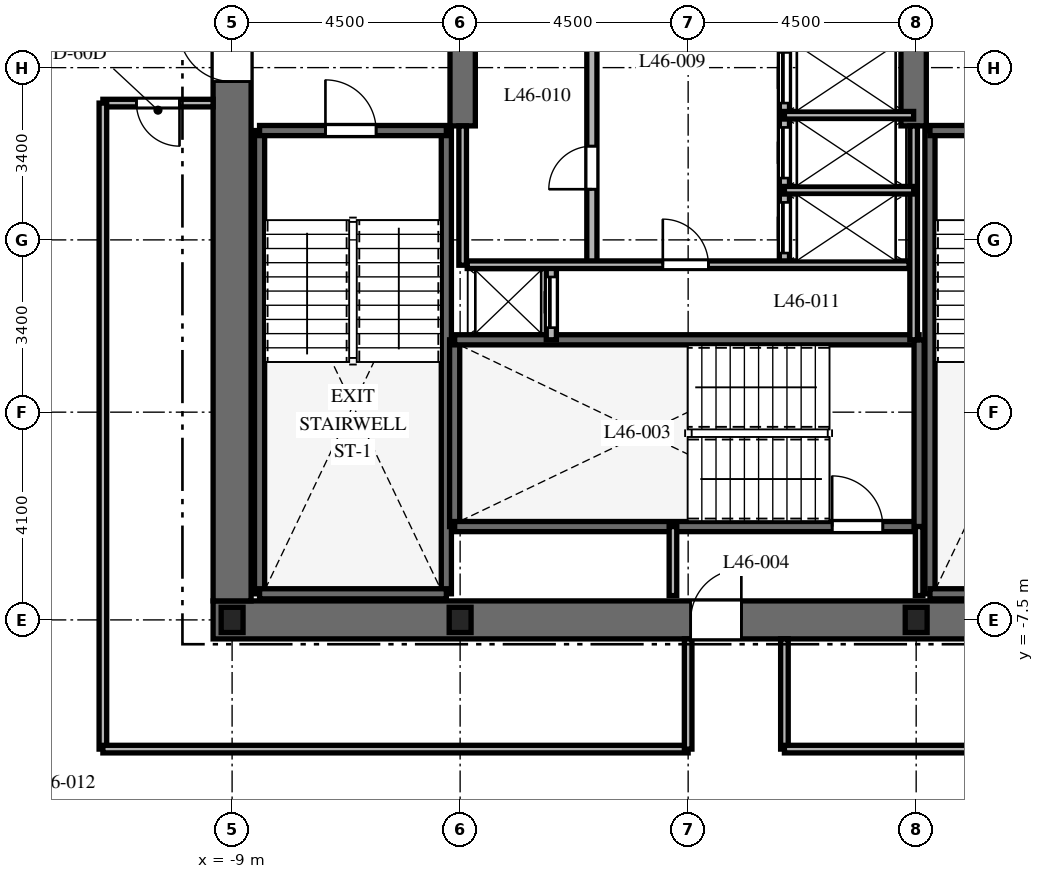
"""IFC4 building model, lengths in metres.
Left out: names, types, materials, properties, quantities, classifications, styles, units other than length and angle.
Written with IfcOpenShell. Run it as: python <this file> out.ifc"""

import sys

from ifc_helpers import new_model, si_unit, direction, frame, frame_2d, origin, origin_2d, place, context, subcontext, project, spatial, rectangle, i_section, extrude, element, fill, save


model = new_model("IFC4")
c1 = context("Model", 3, precision=1e-05, world=origin(), true_north=direction((0.0, 1.0)))
c2 = subcontext(c1, "Body", "Model", "MODEL_VIEW")
j1 = project(units=[si_unit("LENGTHUNIT", "METRE"), si_unit("PLANEANGLEUNIT", "RADIAN")], contexts=[c1])
p1 = place(None, origin())
s1 = spatial("IfcSite", under=j1, at=p1, CompositionType="ELEMENT")
p2 = place(p1, origin())
s2 = spatial("IfcBuilding", under=s1, at=p2, CompositionType="ELEMENT")
p3 = place(p2, frame((0.0, 0.0, 186.7)))
s3 = spatial("IfcBuildingStorey", under=s2, at=p3, CompositionType="ELEMENT", Elevation=186.7)
p4 = place(p3, frame((-9.375, -7.5, 0.0), z_axis=(0.0, 0.0, 1.0), x_axis=(1.0, 0.0, 0.0)))
e1 = element("IfcWall", 1, at=p4, inside=s3, PredefinedType="SHEAR", context=c2, shape_type="SweptSolid", body=[
    extrude(rectangle(XDim=18.75, YDim=0.75, at=frame_2d((9.375, 0.0))), origin(), (0.0, 0.0, 1.0), 3.7),
])
p5 = place(p4, frame((9.425, 0.0, 0.0)))
e2 = element("IfcOpeningElement", 2, at=p5, cuts=e1, PredefinedType="OPENING", context=c2, shape_type="SweptSolid", body=[
    extrude(rectangle(XDim=1.0, YDim=2.15, at=frame_2d((0.5, 1.075))), frame((0.0, 0.385, 0.0), z_axis=(0.0, -1.0, 0.0), x_axis=(1.0, 0.0, 0.0)), (0.0, 0.0, 1.0), 0.77),
])
p6 = place(p3, frame((-9.0, -7.125, 0.0), z_axis=(0.0, 0.0, 1.0), x_axis=(0.0, 1.0, 0.0)))
e3 = element("IfcWall", 3, at=p6, inside=s3, PredefinedType="SHEAR", context=c2, shape_type="SweptSolid", body=[
    extrude(rectangle(XDim=14.25, YDim=0.75, at=frame_2d((7.125, 0.0))), origin(), (0.0, 0.0, 1.0), 3.7),
])
p7 = place(p6, frame((10.25, 0.0, 0.0)))
e4 = element("IfcOpeningElement", 4, at=p7, cuts=e3, PredefinedType="OPENING", context=c2, shape_type="SweptSolid", body=[
    extrude(rectangle(XDim=1.05, YDim=2.15, at=frame_2d((0.525, 1.075))), frame((0.0, 0.385, 0.0), z_axis=(0.0, -1.0, 0.0), x_axis=(1.0, 0.0, 0.0)), (0.0, 0.0, 1.0), 0.77),
])
for number, where, z_axis, x_axis in (
    (5, (-4.45, 2.25, 0.0), (0.0, 0.0, 1.0), (0.0, 1.0, 0.0)),
    (6, (4.45, 2.25, 0.0), (0.0, 0.0, 1.0), (0.0, 1.0, 0.0)),
):
    element("IfcWall", number, at=place(p3, frame(where, z_axis=z_axis, x_axis=x_axis)), inside=s3, PredefinedType="SHEAR", context=c2, shape_type="SweptSolid", body=[
        extrude(rectangle(XDim=4.875, YDim=0.5, at=frame_2d((2.438, 0.0))), origin(), (0.0, 0.0, 1.0), 3.7),
    ])
for number, where, z_axis, x_axis in (
    (7, (-8.458, -6.985, 0.0), (0.0, 0.0, 1.0), (0.0, 1.0, 0.0)),
    (8, (-4.772, -6.985, 0.0), (0.0, 0.0, 1.0), (0.0, 1.0, 0.0)),
):
    element("IfcWall", number, at=place(p3, frame(where, z_axis=z_axis, x_axis=x_axis)), inside=s3, PredefinedType="SHEAR", context=c2, shape_type="SweptSolid", body=[
        extrude(rectangle(XDim=9.143, YDim=0.2, at=frame_2d((4.572, 0.0))), origin(), (0.0, 0.0, 1.0), 3.7),
    ])
p8 = place(p3, frame((-8.458, -6.985, 0.0), z_axis=(0.0, 0.0, 1.0), x_axis=(1.0, 0.0, 0.0)))
e9 = element("IfcWall", 9, at=p8, inside=s3, PredefinedType="SHEAR", context=c2, shape_type="SweptSolid", body=[
    extrude(rectangle(XDim=3.686, YDim=0.2, at=frame_2d((1.843, 0.0))), origin(), (0.0, 0.0, 1.0), 3.7),
])
p9 = place(p3, frame((-8.458, 2.158, 0.0), z_axis=(0.0, 0.0, 1.0), x_axis=(1.0, 0.0, 0.0)))
e10 = element("IfcWall", 10, at=p9, inside=s3, PredefinedType="SHEAR", context=c2, shape_type="SweptSolid", body=[
    extrude(rectangle(XDim=3.686, YDim=0.2, at=frame_2d((1.843, 0.0))), origin(), (0.0, 0.0, 1.0), 3.7),
])
p10 = place(p9, frame((1.3, 0.0, 0.0)))
e11 = element("IfcOpeningElement", 11, at=p10, cuts=e10, PredefinedType="OPENING", context=c2, shape_type="SweptSolid", body=[
    extrude(rectangle(XDim=1.0, YDim=2.15, at=frame_2d((0.5, 1.075))), frame((0.0, 0.11, 0.0), z_axis=(0.0, -1.0, 0.0), x_axis=(1.0, 0.0, 0.0)), (0.0, 0.0, 1.0), 0.22),
])
p11 = place(p3, frame((4.772, -6.985, 0.0), z_axis=(0.0, 0.0, 1.0), x_axis=(0.0, 1.0, 0.0)))
e12 = element("IfcWall", 12, at=p11, inside=s3, PredefinedType="SHEAR", context=c2, shape_type="SweptSolid", body=[
    extrude(rectangle(XDim=9.143, YDim=0.2, at=frame_2d((4.572, 0.0))), origin(), (0.0, 0.0, 1.0), 3.7),
])
p12 = place(p3, frame((4.772, -6.985, 0.0), z_axis=(0.0, 0.0, 1.0), x_axis=(1.0, 0.0, 0.0)))
e13 = element("IfcWall", 13, at=p12, inside=s3, PredefinedType="SHEAR", context=c2, shape_type="SweptSolid", body=[
    extrude(rectangle(XDim=3.686, YDim=0.2, at=frame_2d((1.843, 0.0))), origin(), (0.0, 0.0, 1.0), 3.7),
])
p13 = place(p3, frame((4.772, 2.158, 0.0), z_axis=(0.0, 0.0, 1.0), x_axis=(1.0, 0.0, 0.0)))
e14 = element("IfcWall", 14, at=p13, inside=s3, PredefinedType="SHEAR", context=c2, shape_type="SweptSolid", body=[
    extrude(rectangle(XDim=3.686, YDim=0.2, at=frame_2d((1.843, 0.0))), origin(), (0.0, 0.0, 1.0), 3.7),
])
p14 = place(p13, frame((1.35, 0.0, 0.0)))
e15 = element("IfcOpeningElement", 15, at=p14, cuts=e14, PredefinedType="OPENING", context=c2, shape_type="SweptSolid", body=[
    extrude(rectangle(XDim=1.0, YDim=2.15, at=frame_2d((0.5, 1.075))), frame((0.0, 0.11, 0.0), z_axis=(0.0, -1.0, 0.0), x_axis=(1.0, 0.0, 0.0)), (0.0, 0.0, 1.0), 0.22),
])
p15 = place(p3, frame((-4.608, -5.658, 0.0), z_axis=(0.0, 0.0, 1.0), x_axis=(0.0, 1.0, 0.0)))
e16 = element("IfcWall", 16, at=p15, inside=s3, PredefinedType="SHEAR", context=c2, shape_type="SweptSolid", body=[
    extrude(rectangle(XDim=3.686, YDim=0.2, at=frame_2d((1.843, 0.0))), origin(), (0.0, 0.0, 1.0), 3.7),
])
p16 = place(p3, frame((-4.608, -5.658, 0.0), z_axis=(0.0, 0.0, 1.0), x_axis=(1.0, 0.0, 0.0)))
e17 = element("IfcWall", 17, at=p16, inside=s3, PredefinedType="SHEAR", context=c2, shape_type="SweptSolid", body=[
    extrude(rectangle(XDim=9.166, YDim=0.2, at=frame_2d((4.583, 0.0))), origin(), (0.0, 0.0, 1.0), 3.7),
])
p17 = place(p16, frame((7.45, 0.0, 0.0)))
e18 = element("IfcOpeningElement", 18, at=p17, cuts=e17, PredefinedType="OPENING", context=c2, shape_type="SweptSolid", body=[
    extrude(rectangle(XDim=1.0, YDim=2.15, at=frame_2d((0.5, 1.075))), frame((0.0, 0.11, 0.0), z_axis=(0.0, -1.0, 0.0), x_axis=(1.0, 0.0, 0.0)), (0.0, 0.0, 1.0), 0.22),
])
p18 = place(p3, frame((-4.608, -1.972, 0.0), z_axis=(0.0, 0.0, 1.0), x_axis=(1.0, 0.0, 0.0)))
e19 = element("IfcWall", 19, at=p18, inside=s3, PredefinedType="SHEAR", context=c2, shape_type="SweptSolid", body=[
    extrude(rectangle(XDim=9.166, YDim=0.2, at=frame_2d((4.583, 0.0))), origin(), (0.0, 0.0, 1.0), 3.7),
])
p19 = place(p3, frame((4.558, -5.658, 0.0), z_axis=(0.0, 0.0, 1.0), x_axis=(0.0, 1.0, 0.0)))
e20 = element("IfcWall", 20, at=p19, inside=s3, PredefinedType="SHEAR", context=c2, shape_type="SweptSolid", body=[
    extrude(rectangle(XDim=3.686, YDim=0.2, at=frame_2d((1.843, 0.0))), origin(), (0.0, 0.0, 1.0), 3.7),
])
for number, where, z_axis, x_axis in (
    (21, (-9.0, -7.5, 0.0), (0.0, 0.0, 1.0), (1.0, 0.0, 0.0)),
    (22, (-4.5, -7.5, 0.0), (0.0, 0.0, 1.0), (1.0, 0.0, 0.0)),
    (23, (4.5, -7.5, 0.0), (0.0, 0.0, 1.0), (1.0, 0.0, 0.0)),
):
    element("IfcColumn", number, at=place(p3, frame(where, z_axis=z_axis, x_axis=x_axis)), inside=s3, PredefinedType="COLUMN", context=c2, shape_type="SweptSolid", body=[
        extrude(i_section(OverallWidth=0.432, OverallDepth=0.498, WebThickness=0.056, FlangeThickness=0.089, at=origin_2d()), origin(), (0.0, 0.0, 1.0), 3.7),
    ])
for number, where, z_axis, x_axis in (
    (24, (-0.3, -7.02, 0.0), (0.0, 0.0, 1.0), (0.0, 1.0, 0.0)),
    (25, (4.558, -7.02, 0.0), (0.0, 0.0, 1.0), (0.0, 1.0, 0.0)),
):
    element("IfcWall", number, at=place(p3, frame(where, z_axis=z_axis, x_axis=x_axis)), inside=s3, PredefinedType="PARTITIONING", context=c2, shape_type="SweptSolid", body=[
        extrude(rectangle(XDim=1.362, YDim=0.15, at=frame_2d((0.681, 0.0))), origin(), (0.0, 0.0, 1.0), 3.4),
    ])
p20 = place(p3, frame((-2.7, -1.972, 0.0), z_axis=(0.0, 0.0, 1.0), x_axis=(0.0, 1.0, 0.0)))
e26 = element("IfcWall", 26, at=p20, inside=s3, PredefinedType="PARTITIONING", context=c2, shape_type="SweptSolid", body=[
    extrude(rectangle(XDim=1.472, YDim=0.2, at=frame_2d((0.736, 0.0))), origin(), (0.0, 0.0, 1.0), 3.4),
])
p21 = place(p20, frame((0.24, 0.0, 0.0)))
e27 = element("IfcOpeningElement", 27, at=p21, cuts=e26, PredefinedType="OPENING", context=c2, shape_type="SweptSolid", body=[
    extrude(rectangle(XDim=1.0, YDim=2.2, at=frame_2d((0.5, 1.1))), frame((0.0, 0.11, 0.0), z_axis=(0.0, -1.0, 0.0), x_axis=(1.0, 0.0, 0.0)), (0.0, 0.0, 1.0), 0.22),
])
p22 = place(p3, frame((-4.45, -0.5, 0.0), z_axis=(0.0, 0.0, 1.0), x_axis=(0.0, 1.0, 0.0)))
e28 = element("IfcWall", 28, at=p22, inside=s3, PredefinedType="PARTITIONING", context=c2, shape_type="SweptSolid", body=[
    extrude(rectangle(XDim=2.75, YDim=0.15, at=frame_2d((1.375, 0.0))), origin(), (0.0, 0.0, 1.0), 3.4),
])
p23 = place(p3, frame((4.45, -1.972, 0.0), z_axis=(0.0, 0.0, 1.0), x_axis=(0.0, 1.0, 0.0)))
e29 = element("IfcWall", 29, at=p23, inside=s3, PredefinedType="PARTITIONING", context=c2, shape_type="SweptSolid", body=[
    extrude(rectangle(XDim=4.222, YDim=0.15, at=frame_2d((2.111, 0.0))), origin(), (0.0, 0.0, 1.0), 3.4),
])
p24 = place(p3, frame((-1.9, -0.5, 0.0), z_axis=(0.0, 0.0, 1.0), x_axis=(0.0, 1.0, 0.0)))
e30 = element("IfcWall", 30, at=p24, inside=s3, PredefinedType="PARTITIONING", context=c2, shape_type="SweptSolid", body=[
    extrude(rectangle(XDim=4.44, YDim=0.2, at=frame_2d((2.22, 0.0))), origin(), (0.0, 0.0, 1.0), 3.4),
])
p25 = place(p24, frame((1.5, 0.0, 0.0)))
e31 = element("IfcOpeningElement", 31, at=p25, cuts=e30, PredefinedType="OPENING", context=c2, shape_type="SweptSolid", body=[
    extrude(rectangle(XDim=0.85, YDim=2.03, at=frame_2d((0.425, 1.015))), frame((0.0, 0.11, 0.0), z_axis=(0.0, -1.0, 0.0), x_axis=(1.0, 0.0, 0.0)), (0.0, 0.0, 1.0), 0.22),
])
p26 = place(p3, frame((1.9, -0.5, 0.0), z_axis=(0.0, 0.0, 1.0), x_axis=(0.0, 1.0, 0.0)))
e32 = element("IfcWall", 32, at=p26, inside=s3, PredefinedType="PARTITIONING", context=c2, shape_type="SweptSolid", body=[
    extrude(rectangle(XDim=4.44, YDim=0.2, at=frame_2d((2.22, 0.0))), origin(), (0.0, 0.0, 1.0), 3.4),
])
p27 = place(p26, frame((0.24, 0.0, 0.0)))
e33 = element("IfcOpeningElement", 33, at=p27, cuts=e32, PredefinedType="OPENING", context=c2, shape_type="SweptSolid", body=[
    extrude(rectangle(XDim=1.0, YDim=2.2, at=frame_2d((0.5, 1.1))), frame((0.0, 0.11, 0.0), z_axis=(0.0, -1.0, 0.0), x_axis=(1.0, 0.0, 0.0)), (0.0, 0.0, 1.0), 0.22),
])
p28 = place(p26, frame((1.72, 0.0, 0.0)))
e34 = element("IfcOpeningElement", 34, at=p28, cuts=e32, PredefinedType="OPENING", context=c2, shape_type="SweptSolid", body=[
    extrude(rectangle(XDim=1.0, YDim=2.2, at=frame_2d((0.5, 1.1))), frame((0.0, 0.11, 0.0), z_axis=(0.0, -1.0, 0.0), x_axis=(1.0, 0.0, 0.0)), (0.0, 0.0, 1.0), 0.22),
])
p29 = place(p26, frame((3.2, 0.0, 0.0)))
e35 = element("IfcOpeningElement", 35, at=p29, cuts=e32, PredefinedType="OPENING", context=c2, shape_type="SweptSolid", body=[
    extrude(rectangle(XDim=1.0, YDim=2.2, at=frame_2d((0.5, 1.1))), frame((0.0, 0.11, 0.0), z_axis=(0.0, -1.0, 0.0), x_axis=(1.0, 0.0, 0.0)), (0.0, 0.0, 1.0), 0.22),
])
for number, where, z_axis, x_axis in (
    (36, (1.9, 0.98, 0.0), (0.0, 0.0, 1.0), (1.0, 0.0, 0.0)),
    (37, (1.9, 2.46, 0.0), (0.0, 0.0, 1.0), (1.0, 0.0, 0.0)),
):
    element("IfcWall", number, at=place(p3, frame(where, z_axis=z_axis, x_axis=x_axis)), inside=s3, PredefinedType="PARTITIONING", context=c2, shape_type="SweptSolid", body=[
        extrude(rectangle(XDim=2.55, YDim=0.15, at=frame_2d((1.275, 0.0))), origin(), (0.0, 0.0, 1.0), 3.4),
    ])
p30 = place(p3, frame((-4.36, -0.49, 0.0), z_axis=(0.0, 0.0, 1.0), x_axis=(1.0, 0.0, 0.0)))
e38 = element("IfcWall", 38, at=p30, inside=s3, PredefinedType="PARTITIONING", context=c2, shape_type="SweptSolid", body=[
    extrude(rectangle(XDim=8.72, YDim=0.15, at=frame_2d((4.36, 0.0))), origin(), (0.0, 0.0, 1.0), 3.4),
])
p31 = place(p30, frame((3.86, 0.0, 0.0)))
e39 = element("IfcOpeningElement", 39, at=p31, cuts=e38, PredefinedType="OPENING", context=c2, shape_type="SweptSolid", body=[
    extrude(rectangle(XDim=0.9, YDim=2.03, at=frame_2d((0.45, 1.015))), frame((0.0, 0.085, 0.0), z_axis=(0.0, -1.0, 0.0), x_axis=(1.0, 0.0, 0.0)), (0.0, 0.0, 1.0), 0.17),
])
p32 = place(p3, frame((-9.375, 2.7, 0.0), z_axis=(0.0, 0.0, 1.0), x_axis=(-1.0, 0.0, 0.0)))
e40 = element("IfcWall", 40, at=p32, inside=s3, PredefinedType="PARTITIONING", context=c2, shape_type="SweptSolid", body=[
    extrude(rectangle(XDim=2.175, YDim=0.15, at=frame_2d((1.087, 0.0))), origin(), (0.0, 0.0, 1.0), 3.4),
])
p33 = place(p32, frame((0.663, 0.0, 0.0)))
e41 = element("IfcOpeningElement", 41, at=p33, cuts=e40, PredefinedType="OPENING", context=c2, shape_type="SweptSolid", body=[
    extrude(rectangle(XDim=0.85, YDim=2.03, at=frame_2d((0.425, 1.015))), frame((0.0, 0.085, 0.0), z_axis=(0.0, -1.0, 0.0), x_axis=(1.0, 0.0, 0.0)), (0.0, 0.0, 1.0), 0.17),
])
p34 = place(p3, frame((-11.55, 2.7, 0.0), z_axis=(0.0, 0.0, 1.0), x_axis=(0.0, -1.0, 0.0)))
e42 = element("IfcWall", 42, at=p34, inside=s3, PredefinedType="PARTITIONING", context=c2, shape_type="SweptSolid", body=[
    extrude(rectangle(XDim=12.75, YDim=0.15, at=frame_2d((6.375, 0.0))), origin(), (0.0, 0.0, 1.0), 2.84),
])
p35 = place(p3, frame((-11.55, -10.05, 0.0), z_axis=(0.0, 0.0, 1.0), x_axis=(1.0, 0.0, 0.0)))
e43 = element("IfcWall", 43, at=p35, inside=s3, PredefinedType="PARTITIONING", context=c2, shape_type="SweptSolid", body=[
    extrude(rectangle(XDim=11.55, YDim=0.15, at=frame_2d((5.775, 0.0))), origin(), (0.0, 0.0, 1.0), 2.84),
])
for number, where, z_axis, x_axis in (
    (44, (0.0, -10.05, 0.0), (0.0, 0.0, 1.0), (0.0, 1.0, 0.0)),
    (45, (1.9, -7.875, 0.0), (0.0, 0.0, 1.0), (0.0, -1.0, 0.0)),
):
    element("IfcWall", number, at=place(p3, frame(where, z_axis=z_axis, x_axis=x_axis)), inside=s3, PredefinedType="PARTITIONING", context=c2, shape_type="SweptSolid", body=[
        extrude(rectangle(XDim=2.175, YDim=0.15, at=frame_2d((1.087, 0.0))), origin(), (0.0, 0.0, 1.0), 3.4),
    ])
p36 = place(p3, frame((1.9, -10.05, 0.0), z_axis=(0.0, 0.0, 1.0), x_axis=(1.0, 0.0, 0.0)))
e46 = element("IfcWall", 46, at=p36, inside=s3, PredefinedType="PARTITIONING", context=c2, shape_type="SweptSolid", body=[
    extrude(rectangle(XDim=9.65, YDim=0.15, at=frame_2d((4.825, 0.0))), origin(), (0.0, 0.0, 1.0), 2.84),
])
p37 = place(p10, origin())
e47 = element("IfcDoor", 47, at=p37, inside=s3, OperationType="SINGLE_SWING_LEFT", PredefinedType="DOOR", context=c2, shape_type="SweptSolid", body=[
    extrude(rectangle(XDim=1.0, YDim=2.15, at=frame_2d((0.5, 1.075))), frame((0.0, 0.025, 0.0), z_axis=(0.0, -1.0, 0.0), x_axis=(1.0, 0.0, 0.0)), (0.0, 0.0, 1.0), 0.05),
])
fill(e11, e47)
p38 = place(p17, origin())
e48 = element("IfcDoor", 48, at=p38, inside=s3, OperationType="SINGLE_SWING_LEFT", PredefinedType="DOOR", context=c2, shape_type="SweptSolid", body=[
    extrude(rectangle(XDim=1.0, YDim=2.15, at=frame_2d((0.5, 1.075))), frame((0.0, 0.025, 0.0), z_axis=(0.0, -1.0, 0.0), x_axis=(1.0, 0.0, 0.0)), (0.0, 0.0, 1.0), 0.05),
])
fill(e18, e48)
p39 = place(p5, origin())
e49 = element("IfcDoor", 49, at=p39, inside=s3, OperationType="SINGLE_SWING_RIGHT", PredefinedType="DOOR", context=c2, shape_type="SweptSolid", body=[
    extrude(rectangle(XDim=1.0, YDim=2.15, at=frame_2d((0.5, 1.075))), frame((0.0, 0.025, 0.0), z_axis=(0.0, -1.0, 0.0), x_axis=(1.0, 0.0, 0.0)), (0.0, 0.0, 1.0), 0.05),
])
fill(e2, e49)
p40 = place(p7, origin())
e50 = element("IfcDoor", 50, at=p40, inside=s3, OperationType="SINGLE_SWING_RIGHT", PredefinedType="DOOR", context=c2, shape_type="SweptSolid", body=[
    extrude(rectangle(XDim=1.05, YDim=2.15, at=frame_2d((0.525, 1.075))), frame((0.0, 0.025, 0.0), z_axis=(0.0, -1.0, 0.0), x_axis=(1.0, 0.0, 0.0)), (0.0, 0.0, 1.0), 0.05),
])
fill(e4, e50)
p41 = place(p21, origin())
e51 = element("IfcDoor", 51, at=p41, inside=s3, OperationType="SLIDING_TO_LEFT", PredefinedType="DOOR", context=c2, shape_type="SweptSolid", body=[
    extrude(rectangle(XDim=1.0, YDim=2.2, at=frame_2d((0.5, 1.1))), frame((0.0, 0.025, 0.0), z_axis=(0.0, -1.0, 0.0), x_axis=(1.0, 0.0, 0.0)), (0.0, 0.0, 1.0), 0.05),
])
fill(e27, e51)
p42 = place(p25, origin())
e52 = element("IfcDoor", 52, at=p42, inside=s3, OperationType="SINGLE_SWING_LEFT", PredefinedType="DOOR", context=c2, shape_type="SweptSolid", body=[
    extrude(rectangle(XDim=0.85, YDim=2.03, at=frame_2d((0.425, 1.015))), frame((0.0, 0.025, 0.0), z_axis=(0.0, -1.0, 0.0), x_axis=(1.0, 0.0, 0.0)), (0.0, 0.0, 1.0), 0.05),
])
fill(e31, e52)
p43 = place(p27, origin())
e53 = element("IfcDoor", 53, at=p43, inside=s3, OperationType="SLIDING_TO_RIGHT", PredefinedType="DOOR", context=c2, shape_type="SweptSolid", body=[
    extrude(rectangle(XDim=1.0, YDim=2.2, at=frame_2d((0.5, 1.1))), frame((0.0, 0.025, 0.0), z_axis=(0.0, -1.0, 0.0), x_axis=(1.0, 0.0, 0.0)), (0.0, 0.0, 1.0), 0.05),
])
fill(e33, e53)
p44 = place(p28, origin())
e54 = element("IfcDoor", 54, at=p44, inside=s3, OperationType="SLIDING_TO_RIGHT", PredefinedType="DOOR", context=c2, shape_type="SweptSolid", body=[
    extrude(rectangle(XDim=1.0, YDim=2.2, at=frame_2d((0.5, 1.1))), frame((0.0, 0.025, 0.0), z_axis=(0.0, -1.0, 0.0), x_axis=(1.0, 0.0, 0.0)), (0.0, 0.0, 1.0), 0.05),
])
fill(e34, e54)
p45 = place(p29, origin())
e55 = element("IfcDoor", 55, at=p45, inside=s3, OperationType="SLIDING_TO_RIGHT", PredefinedType="DOOR", context=c2, shape_type="SweptSolid", body=[
    extrude(rectangle(XDim=1.0, YDim=2.2, at=frame_2d((0.5, 1.1))), frame((0.0, 0.025, 0.0), z_axis=(0.0, -1.0, 0.0), x_axis=(1.0, 0.0, 0.0)), (0.0, 0.0, 1.0), 0.05),
])
fill(e35, e55)
p46 = place(p31, origin())
e56 = element("IfcDoor", 56, at=p46, inside=s3, OperationType="SINGLE_SWING_LEFT", PredefinedType="DOOR", context=c2, shape_type="SweptSolid", body=[
    extrude(rectangle(XDim=0.9, YDim=2.03, at=frame_2d((0.45, 1.015))), frame((0.0, 0.025, 0.0), z_axis=(0.0, -1.0, 0.0), x_axis=(1.0, 0.0, 0.0)), (0.0, 0.0, 1.0), 0.05),
])
fill(e39, e56)
p47 = place(p33, origin())
e57 = element("IfcDoor", 57, at=p47, inside=s3, OperationType="SINGLE_SWING_LEFT", PredefinedType="DOOR", context=c2, shape_type="SweptSolid", body=[
    extrude(rectangle(XDim=0.85, YDim=2.03, at=frame_2d((0.425, 1.015))), frame((0.0, 0.025, 0.0), z_axis=(0.0, -1.0, 0.0), x_axis=(1.0, 0.0, 0.0)), (0.0, 0.0, 1.0), 0.05),
])
fill(e41, e57)
save(model, sys.argv[1])
